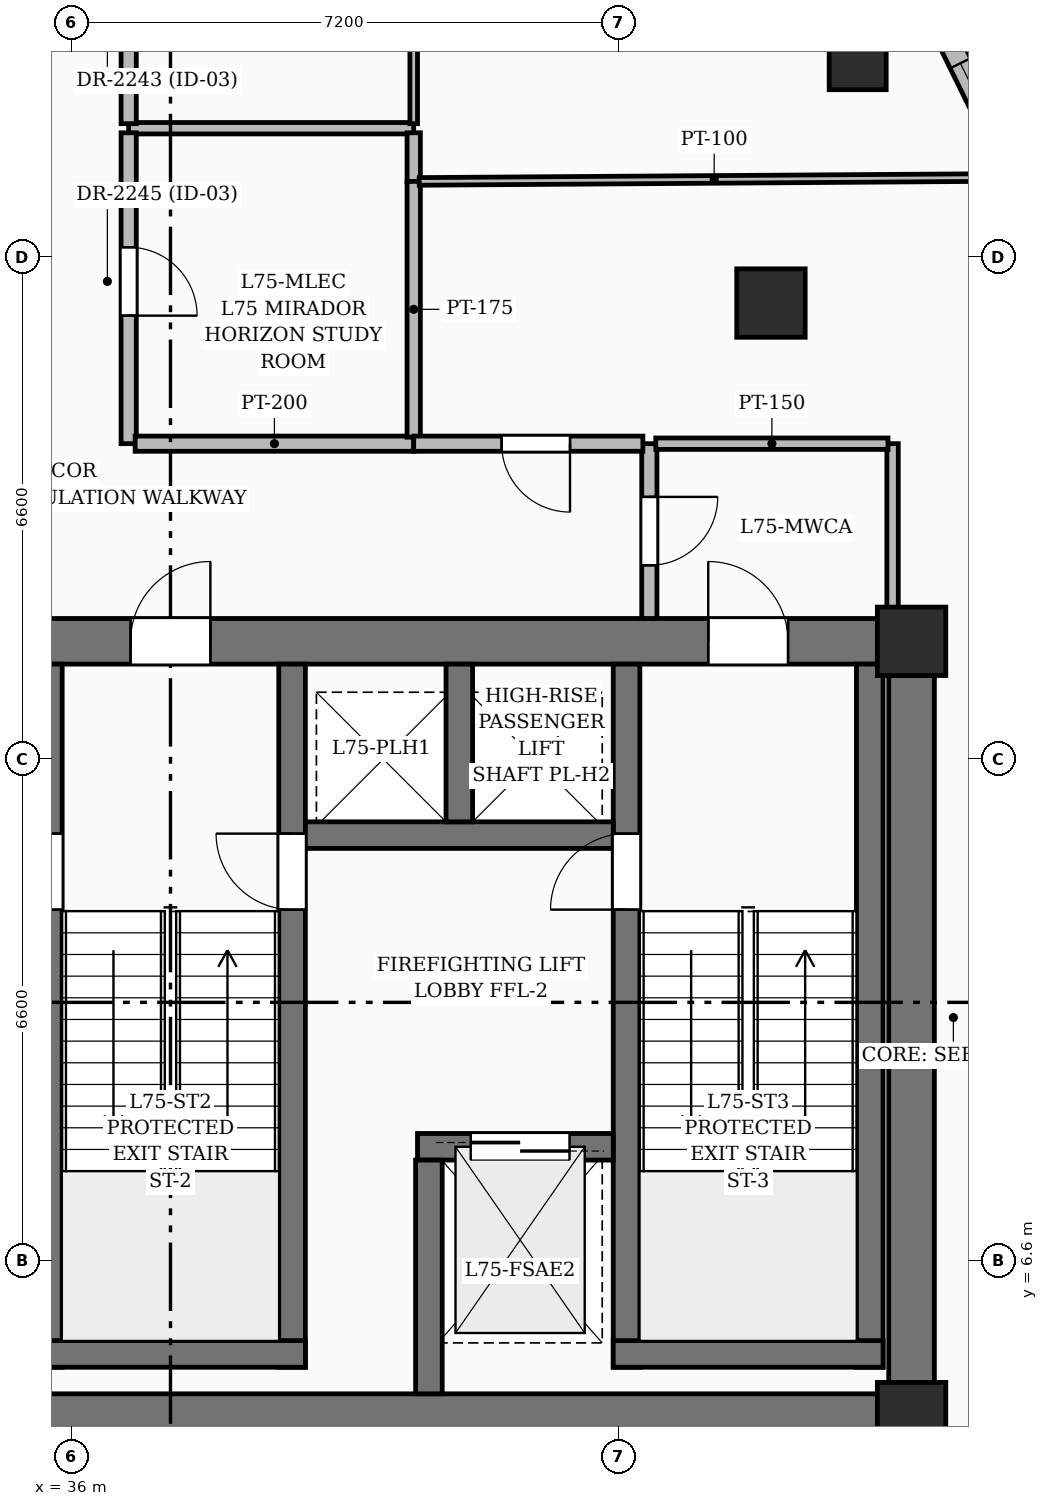
"""IFC4 building model, lengths in metres.
Left out: names, types, materials, properties, quantities, classifications, styles, units other than length and angle.
Written with IfcOpenShell. Run it as: python <this file> out.ifc"""

import sys

from ifc_helpers import new_model, si_unit, direction, frame, frame_2d, origin, origin_2d, place, context, subcontext, project, spatial, rectangle, extrude, element, fill, save


model = new_model("IFC4")
c1 = context("Model", 3, precision=1e-05, world=origin(), true_north=direction((0.0, 1.0)))
c2 = subcontext(c1, "Body", "Model", "MODEL_VIEW")
j1 = project(units=[si_unit("LENGTHUNIT", "METRE"), si_unit("PLANEANGLEUNIT", "RADIAN")], contexts=[c1])
p1 = place(None, origin())
s1 = spatial("IfcSite", under=j1, at=p1, CompositionType="ELEMENT")
p2 = place(p1, origin())
s2 = spatial("IfcBuilding", under=s1, at=p2, CompositionType="ELEMENT")
p3 = place(p2, frame((0.0, 0.0, 289.5)))
s3 = spatial("IfcBuildingStorey", under=s2, at=p3, CompositionType="ELEMENT", Elevation=289.5)
for number, where, z_axis, x_axis in (
    (1, (47.05, 4.55, 0.0), (0.0, 0.0, 1.0), (1.0, 0.0, 0.0)),
    (2, (47.05, 14.75, 0.0), (0.0, 0.0, 1.0), (1.0, 0.0, 0.0)),
    (3, (45.2, 19.2, 0.0), (0.0, 0.0, 1.0), (1.0, 0.0, 0.0)),
):
    element("IfcColumn", number, at=place(p3, frame(where, z_axis=z_axis, x_axis=x_axis)), inside=s3, PredefinedType="COLUMN", context=c2, shape_type="SweptSolid", body=[
        extrude(rectangle(XDim=0.9, YDim=0.9, at=origin_2d()), origin(), (0.0, 0.0, 1.0), 4.5),
    ])
p4 = place(p3, frame((35.6, 4.55, 0.0), z_axis=(0.0, 0.0, 1.0), x_axis=(1.0, 0.0, 0.0)))
e4 = element("IfcWall", 4, at=p4, inside=s3, PredefinedType="SHEAR", context=c2, shape_type="SweptSolid", body=[
    extrude(rectangle(XDim=11.0, YDim=0.6, at=frame_2d((5.5, 0.0))), origin(), (0.0, 0.0, 1.0), 4.5),
])
p5 = place(p3, frame((35.6, 14.75, 0.0), z_axis=(0.0, 0.0, 1.0), x_axis=(1.0, 0.0, 0.0)))
e5 = element("IfcWall", 5, at=p5, inside=s3, PredefinedType="SHEAR", context=c2, shape_type="SweptSolid", body=[
    extrude(rectangle(XDim=11.0, YDim=0.6, at=frame_2d((5.5, 0.0))), origin(), (0.0, 0.0, 1.0), 4.5),
])
p6 = place(p5, frame((1.175, 0.0, 0.0)))
e6 = element("IfcOpeningElement", 6, at=p6, cuts=e5, PredefinedType="OPENING", context=c2, shape_type="SweptSolid", body=[
    extrude(rectangle(XDim=1.05, YDim=2.15, at=frame_2d((0.525, 1.075))), frame((0.0, 0.31, 0.0), z_axis=(0.0, -1.0, 0.0), x_axis=(1.0, 0.0, 0.0)), (0.0, 0.0, 1.0), 0.62),
])
p7 = place(p5, frame((8.775, 0.0, 0.0)))
e7 = element("IfcOpeningElement", 7, at=p7, cuts=e5, PredefinedType="OPENING", context=c2, shape_type="SweptSolid", body=[
    extrude(rectangle(XDim=1.05, YDim=2.15, at=frame_2d((0.525, 1.075))), frame((0.0, 0.31, 0.0), z_axis=(0.0, -1.0, 0.0), x_axis=(1.0, 0.0, 0.0)), (0.0, 0.0, 1.0), 0.62),
])
p8 = place(p3, frame((47.05, 5.0, 0.0), z_axis=(0.0, 0.0, 1.0), x_axis=(0.0, 1.0, 0.0)))
e8 = element("IfcWall", 8, at=p8, inside=s3, PredefinedType="SHEAR", context=c2, shape_type="SweptSolid", body=[
    extrude(rectangle(XDim=9.3, YDim=0.6, at=frame_2d((4.65, 0.0))), origin(), (0.0, 0.0, 1.0), 4.5),
])
p9 = place(p3, frame((35.7, 5.2, 0.0), z_axis=(0.0, 0.0, 1.0), x_axis=(0.0, 1.0, 0.0)))
e9 = element("IfcWall", 9, at=p9, inside=s3, PredefinedType="SOLIDWALL", context=c2, shape_type="SweptSolid", body=[
    extrude(rectangle(XDim=9.25, YDim=0.35, at=frame_2d((4.625, 0.0))), origin(), (0.0, 0.0, 1.0), 4.5),
])
p10 = place(p9, frame((6.02, 0.0, 0.0)))
e10 = element("IfcOpeningElement", 10, at=p10, cuts=e9, PredefinedType="OPENING", context=c2, shape_type="SweptSolid", body=[
    extrude(rectangle(XDim=1.0, YDim=2.15, at=frame_2d((0.5, 1.075))), frame((0.0, 0.185, 0.0), z_axis=(0.0, -1.0, 0.0), x_axis=(1.0, 0.0, 0.0)), (0.0, 0.0, 1.0), 0.37),
])
p11 = place(p3, frame((38.9, 5.2, 0.0), z_axis=(0.0, 0.0, 1.0), x_axis=(0.0, 1.0, 0.0)))
e11 = element("IfcWall", 11, at=p11, inside=s3, PredefinedType="SOLIDWALL", context=c2, shape_type="SweptSolid", body=[
    extrude(rectangle(XDim=9.25, YDim=0.35, at=frame_2d((4.625, 0.0))), origin(), (0.0, 0.0, 1.0), 4.5),
])
p12 = place(p11, frame((6.02, 0.0, 0.0)))
e12 = element("IfcOpeningElement", 12, at=p12, cuts=e11, PredefinedType="OPENING", context=c2, shape_type="SweptSolid", body=[
    extrude(rectangle(XDim=1.0, YDim=2.15, at=frame_2d((0.5, 1.075))), frame((0.0, 0.185, 0.0), z_axis=(0.0, -1.0, 0.0), x_axis=(1.0, 0.0, 0.0)), (0.0, 0.0, 1.0), 0.37),
])
p13 = place(p3, frame((35.525, 5.375, 0.0), z_axis=(0.0, 0.0, 1.0), x_axis=(1.0, 0.0, 0.0)))
e13 = element("IfcWall", 13, at=p13, inside=s3, PredefinedType="SOLIDWALL", context=c2, shape_type="SweptSolid", body=[
    extrude(rectangle(XDim=3.55, YDim=0.35, at=frame_2d((1.775, 0.0))), origin(), (0.0, 0.0, 1.0), 4.5),
])
p14 = place(p3, frame((43.3, 5.2, 0.0), z_axis=(0.0, 0.0, 1.0), x_axis=(0.0, 1.0, 0.0)))
e14 = element("IfcWall", 14, at=p14, inside=s3, PredefinedType="SOLIDWALL", context=c2, shape_type="SweptSolid", body=[
    extrude(rectangle(XDim=9.25, YDim=0.35, at=frame_2d((4.625, 0.0))), origin(), (0.0, 0.0, 1.0), 4.5),
])
p15 = place(p14, frame((6.02, 0.0, 0.0)))
e15 = element("IfcOpeningElement", 15, at=p15, cuts=e14, PredefinedType="OPENING", context=c2, shape_type="SweptSolid", body=[
    extrude(rectangle(XDim=1.0, YDim=2.15, at=frame_2d((0.5, 1.075))), frame((0.0, 0.185, 0.0), z_axis=(0.0, -1.0, 0.0), x_axis=(1.0, 0.0, 0.0)), (0.0, 0.0, 1.0), 0.37),
])
p16 = place(p3, frame((46.5, 5.2, 0.0), z_axis=(0.0, 0.0, 1.0), x_axis=(0.0, 1.0, 0.0)))
e16 = element("IfcWall", 16, at=p16, inside=s3, PredefinedType="SOLIDWALL", context=c2, shape_type="SweptSolid", body=[
    extrude(rectangle(XDim=9.25, YDim=0.35, at=frame_2d((4.625, 0.0))), origin(), (0.0, 0.0, 1.0), 4.5),
])
p17 = place(p3, frame((43.125, 5.375, 0.0), z_axis=(0.0, 0.0, 1.0), x_axis=(1.0, 0.0, 0.0)))
e17 = element("IfcWall", 17, at=p17, inside=s3, PredefinedType="SOLIDWALL", context=c2, shape_type="SweptSolid", body=[
    extrude(rectangle(XDim=3.55, YDim=0.35, at=frame_2d((1.775, 0.0))), origin(), (0.0, 0.0, 1.0), 4.5),
])
p18 = place(p3, frame((40.55, 8.1, 0.0), z_axis=(0.0, 0.0, 1.0), x_axis=(1.0, 0.0, 0.0)))
e18 = element("IfcWall", 18, at=p18, inside=s3, PredefinedType="SOLIDWALL", context=c2, shape_type="SweptSolid", body=[
    extrude(rectangle(XDim=2.575, YDim=0.35, at=frame_2d((1.288, 0.0))), origin(), (0.0, 0.0, 1.0), 4.5),
])
p19 = place(p18, frame((0.7, 0.0, 0.0)))
e19 = element("IfcOpeningElement", 19, at=p19, cuts=e18, PredefinedType="OPENING", context=c2, shape_type="SweptSolid", body=[
    extrude(rectangle(XDim=1.3, YDim=2.25, at=frame_2d((0.65, 1.125))), frame((0.0, 0.185, 0.0), z_axis=(0.0, -1.0, 0.0), x_axis=(1.0, 0.0, 0.0)), (0.0, 0.0, 1.0), 0.37),
])
p20 = place(p3, frame((40.7, 4.85, 0.0), z_axis=(0.0, 0.0, 1.0), x_axis=(0.0, 1.0, 0.0)))
e20 = element("IfcWall", 20, at=p20, inside=s3, PredefinedType="SOLIDWALL", context=c2, shape_type="SweptSolid", body=[
    extrude(rectangle(XDim=3.075, YDim=0.35, at=frame_2d((1.538, 0.0))), origin(), (0.0, 0.0, 1.0), 4.5),
])
p21 = place(p3, frame((39.075, 12.2, 0.0), z_axis=(0.0, 0.0, 1.0), x_axis=(1.0, 0.0, 0.0)))
e21 = element("IfcWall", 21, at=p21, inside=s3, PredefinedType="SOLIDWALL", context=c2, shape_type="SweptSolid", body=[
    extrude(rectangle(XDim=4.05, YDim=0.35, at=frame_2d((2.025, 0.0))), origin(), (0.0, 0.0, 1.0), 4.5),
])
p22 = place(p3, frame((41.1, 12.375, 0.0), z_axis=(0.0, 0.0, 1.0), x_axis=(0.0, 1.0, 0.0)))
e22 = element("IfcWall", 22, at=p22, inside=s3, PredefinedType="SOLIDWALL", context=c2, shape_type="SweptSolid", body=[
    extrude(rectangle(XDim=2.075, YDim=0.35, at=frame_2d((1.038, 0.0))), origin(), (0.0, 0.0, 1.0), 4.5),
])
p23 = place(p3, frame((46.341, 22.382, 0.0), z_axis=(0.0, 0.0, 1.0), x_axis=(1.0, 0.0, 0.0)))
e23 = element("IfcColumn", 23, at=p23, inside=s3, PredefinedType="COLUMN", context=c2, shape_type="SweptSolid", body=[
    extrude(rectangle(XDim=0.75, YDim=0.75, at=origin_2d()), origin(), (0.0, 0.0, 1.0), 4.5),
])
p24 = place(p3, frame((47.45, 22.848, 0.0), z_axis=(0.0, 0.0, 1.0), x_axis=(0.441291922586, -0.897363604711, 0.0)))
e24 = element("IfcWall", 24, at=p24, inside=s3, PredefinedType="SOLIDWALL", context=c2, shape_type="SweptSolid", body=[
    extrude(rectangle(XDim=6.624, YDim=0.3, at=frame_2d((3.312, 0.0))), origin(), (0.0, 0.0, 1.0), 4.2),
])
p25 = place(p24, frame((0.55, 0.0, 0.8)))
e25 = element("IfcOpeningElement", 25, at=p25, cuts=e24, PredefinedType="OPENING", context=c2, shape_type="SweptSolid", body=[
    extrude(rectangle(XDim=1.2, YDim=1.8, at=frame_2d((0.6, 0.9))), frame((0.0, 0.16, 0.0), z_axis=(0.0, -1.0, 0.0), x_axis=(1.0, 0.0, 0.0)), (0.0, 0.0, 1.0), 0.32),
])
p26 = place(p24, frame((3.35, 0.0, 0.55)))
e26 = element("IfcOpeningElement", 26, at=p26, cuts=e24, PredefinedType="OPENING", context=c2, shape_type="SweptSolid", body=[
    extrude(rectangle(XDim=1.6, YDim=2.2, at=frame_2d((0.8, 1.1))), frame((0.0, 0.16, 0.0), z_axis=(0.0, -1.0, 0.0), x_axis=(1.0, 0.0, 0.0)), (0.0, 0.0, 1.0), 0.32),
])
p27 = place(p3, frame((43.6, 17.35, 0.0), z_axis=(0.0, 0.0, 1.0), x_axis=(0.0, -1.0, 0.0)))
e27 = element("IfcWall", 27, at=p27, inside=s3, PredefinedType="PARTITIONING", context=c2, shape_type="SweptSolid", body=[
    extrude(rectangle(XDim=2.3, YDim=0.2, at=frame_2d((1.15, 0.0))), origin(), (0.0, 0.0, 1.0), 4.2),
])
p28 = place(p27, frame((0.7, 0.0, 0.0)))
e28 = element("IfcOpeningElement", 28, at=p28, cuts=e27, PredefinedType="OPENING", context=c2, shape_type="SweptSolid", body=[
    extrude(rectangle(XDim=0.9, YDim=2.1, at=frame_2d((0.45, 1.05))), frame((0.0, 0.11, 0.0), z_axis=(0.0, -1.0, 0.0), x_axis=(1.0, 0.0, 0.0)), (0.0, 0.0, 1.0), 0.22),
])
p29 = place(p3, frame((46.8, 15.05, 0.0), z_axis=(0.0, 0.0, 1.0), x_axis=(0.0, 1.0, 0.0)))
e29 = element("IfcWall", 29, at=p29, inside=s3, PredefinedType="PARTITIONING", context=c2, shape_type="SweptSolid", body=[
    extrude(rectangle(XDim=2.3, YDim=0.15, at=frame_2d((1.15, 0.0))), origin(), (0.0, 0.0, 1.0), 3.535),
])
p30 = place(p3, frame((46.74, 17.35, 0.0), z_axis=(0.0, 0.0, 1.0), x_axis=(-1.0, 0.0, 0.0)))
e30 = element("IfcWall", 30, at=p30, inside=s3, PredefinedType="PARTITIONING", context=c2, shape_type="SweptSolid", body=[
    extrude(rectangle(XDim=3.055, YDim=0.15, at=frame_2d((1.527, 0.0))), origin(), (0.0, 0.0, 1.0), 3.535),
])
p31 = place(p3, frame((36.75, 21.5, 0.0), z_axis=(0.0, 0.0, 1.0), x_axis=(1.0, 0.0, 0.0)))
e31 = element("IfcWall", 31, at=p31, inside=s3, PredefinedType="PARTITIONING", context=c2, shape_type="SweptSolid", body=[
    extrude(rectangle(XDim=3.75, YDim=0.15, at=frame_2d((1.875, 0.0))), origin(), (0.0, 0.0, 1.0), 3.535),
])
p32 = place(p3, frame((40.5, 21.56, 0.0), z_axis=(0.0, 0.0, 1.0), x_axis=(0.0, 1.0, 0.0)))
e32 = element("IfcWall", 32, at=p32, inside=s3, PredefinedType="PARTITIONING", context=c2, shape_type="SweptSolid", body=[
    extrude(rectangle(XDim=3.34, YDim=0.1, at=frame_2d((1.67, 0.0))), origin(), (0.0, 0.0, 1.0), 3.535),
])
p33 = place(p32, frame((1.222, 0.0, 0.0)))
e33 = element("IfcOpeningElement", 33, at=p33, cuts=e32, PredefinedType="OPENING", context=c2, shape_type="SweptSolid", body=[
    extrude(rectangle(XDim=0.95, YDim=2.2, at=frame_2d((0.475, 1.1))), frame((0.0, 0.06, 0.0), z_axis=(0.0, -1.0, 0.0), x_axis=(1.0, 0.0, 0.0)), (0.0, 0.0, 1.0), 0.12),
])
p34 = place(p3, frame((36.75, 24.827, 0.0), z_axis=(0.0, 0.0, 1.0), x_axis=(0.0, -1.0, 0.0)))
e34 = element("IfcWall", 34, at=p34, inside=s3, PredefinedType="PARTITIONING", context=c2, shape_type="SweptSolid", body=[
    extrude(rectangle(XDim=3.267, YDim=0.2, at=frame_2d((1.634, 0.0))), origin(), (0.0, 0.0, 1.0), 3.86),
])
p35 = place(p34, frame((1.119, 0.0, 0.0)))
e35 = element("IfcOpeningElement", 35, at=p35, cuts=e34, PredefinedType="OPENING", context=c2, shape_type="SweptSolid", body=[
    extrude(rectangle(XDim=0.9, YDim=2.1, at=frame_2d((0.45, 1.05))), frame((0.0, 0.11, 0.0), z_axis=(0.0, -1.0, 0.0), x_axis=(1.0, 0.0, 0.0)), (0.0, 0.0, 1.0), 0.22),
])
p36 = place(p3, frame((40.5, 20.8, 0.0), z_axis=(0.0, 0.0, 1.0), x_axis=(0.0, 1.0, 0.0)))
e36 = element("IfcWall", 36, at=p36, inside=s3, PredefinedType="PARTITIONING", context=c2, shape_type="SweptSolid", body=[
    extrude(rectangle(XDim=0.64, YDim=0.175, at=frame_2d((0.32, 0.0))), origin(), (0.0, 0.0, 1.0), 4.2),
])
p37 = place(p3, frame((36.75, 21.44, 0.0), z_axis=(0.0, 0.0, 1.0), x_axis=(0.0, -1.0, 0.0)))
e37 = element("IfcWall", 37, at=p37, inside=s3, PredefinedType="PARTITIONING", context=c2, shape_type="SweptSolid", body=[
    extrude(rectangle(XDim=4.09, YDim=0.2, at=frame_2d((2.045, 0.0))), origin(), (0.0, 0.0, 1.0), 3.535),
])
p38 = place(p37, frame((1.506, 0.0, 0.0)))
e38 = element("IfcOpeningElement", 38, at=p38, cuts=e37, PredefinedType="OPENING", context=c2, shape_type="SweptSolid", body=[
    extrude(rectangle(XDim=0.9, YDim=2.1, at=frame_2d((0.45, 1.05))), frame((0.0, 0.11, 0.0), z_axis=(0.0, -1.0, 0.0), x_axis=(1.0, 0.0, 0.0)), (0.0, 0.0, 1.0), 0.22),
])
p39 = place(p3, frame((36.835, 17.35, 0.0), z_axis=(0.0, 0.0, 1.0), x_axis=(1.0, 0.0, 0.0)))
e39 = element("IfcWall", 39, at=p39, inside=s3, PredefinedType="PARTITIONING", context=c2, shape_type="SweptSolid", body=[
    extrude(rectangle(XDim=3.665, YDim=0.2, at=frame_2d((1.833, 0.0))), origin(), (0.0, 0.0, 1.0), 4.2),
])
p40 = place(p3, frame((40.5, 17.435, 0.0), z_axis=(0.0, 0.0, 1.0), x_axis=(0.0, 1.0, 0.0)))
e40 = element("IfcWall", 40, at=p40, inside=s3, PredefinedType="PARTITIONING", context=c2, shape_type="SweptSolid", body=[
    extrude(rectangle(XDim=3.365, YDim=0.175, at=frame_2d((1.683, 0.0))), origin(), (0.0, 0.0, 1.0), 4.2),
])
p41 = place(p3, frame((40.573, 20.8, 0.0), z_axis=(0.0, 0.0, 1.0), x_axis=(0.999976919028, 0.006794218946, 0.0)))
e41 = element("IfcWall", 41, at=p41, inside=s3, PredefinedType="PARTITIONING", context=c2, shape_type="SweptSolid", body=[
    extrude(rectangle(XDim=7.762, YDim=0.1, at=frame_2d((3.881, 0.0))), origin(), (0.0, 0.0, 1.0), 3.391),
])
p42 = place(p3, frame((43.515, 17.35, 0.0), z_axis=(0.0, 0.0, 1.0), x_axis=(-1.0, 0.0, 0.0)))
e42 = element("IfcWall", 42, at=p42, inside=s3, PredefinedType="PARTITIONING", context=c2, shape_type="SweptSolid", body=[
    extrude(rectangle(XDim=3.015, YDim=0.2, at=frame_2d((1.507, 0.0))), origin(), (0.0, 0.0, 1.0), 4.2),
])
p43 = place(p42, frame((0.958, 0.0, 0.0)))
e43 = element("IfcOpeningElement", 43, at=p43, cuts=e42, PredefinedType="OPENING", context=c2, shape_type="SweptSolid", body=[
    extrude(rectangle(XDim=0.9, YDim=2.1, at=frame_2d((0.45, 1.05))), frame((0.0, 0.11, 0.0), z_axis=(0.0, -1.0, 0.0), x_axis=(1.0, 0.0, 0.0)), (0.0, 0.0, 1.0), 0.22),
])
p44 = place(p25, origin())
e44 = element("IfcWindow", 44, at=p44, inside=s3, PartitioningType="SINGLE_PANEL", PredefinedType="WINDOW", context=c2, shape_type="SweptSolid", body=[
    extrude(rectangle(XDim=1.2, YDim=1.8, at=frame_2d((0.6, 0.9))), frame((0.0, 0.03, 0.0), z_axis=(0.0, -1.0, 0.0), x_axis=(1.0, 0.0, 0.0)), (0.0, 0.0, 1.0), 0.06),
])
fill(e25, e44)
p45 = place(p6, origin())
e45 = element("IfcDoor", 45, at=p45, inside=s3, OperationType="SINGLE_SWING_RIGHT", PredefinedType="DOOR", context=c2, shape_type="SweptSolid", body=[
    extrude(rectangle(XDim=1.05, YDim=2.15, at=frame_2d((0.525, 1.075))), frame((0.0, 0.025, 0.0), z_axis=(0.0, -1.0, 0.0), x_axis=(1.0, 0.0, 0.0)), (0.0, 0.0, 1.0), 0.05),
])
fill(e6, e45)
p46 = place(p7, origin())
e46 = element("IfcDoor", 46, at=p46, inside=s3, OperationType="SINGLE_SWING_LEFT", PredefinedType="DOOR", context=c2, shape_type="SweptSolid", body=[
    extrude(rectangle(XDim=1.05, YDim=2.15, at=frame_2d((0.525, 1.075))), frame((0.0, 0.025, 0.0), z_axis=(0.0, -1.0, 0.0), x_axis=(1.0, 0.0, 0.0)), (0.0, 0.0, 1.0), 0.05),
])
fill(e7, e46)
p47 = place(p12, origin())
e47 = element("IfcDoor", 47, at=p47, inside=s3, OperationType="SINGLE_SWING_RIGHT", PredefinedType="DOOR", context=c2, shape_type="SweptSolid", body=[
    extrude(rectangle(XDim=1.0, YDim=2.15, at=frame_2d((0.5, 1.075))), frame((0.0, 0.025, 0.0), z_axis=(0.0, -1.0, 0.0), x_axis=(1.0, 0.0, 0.0)), (0.0, 0.0, 1.0), 0.05),
])
fill(e12, e47)
p48 = place(p15, origin())
e48 = element("IfcDoor", 48, at=p48, inside=s3, OperationType="SINGLE_SWING_LEFT", PredefinedType="DOOR", context=c2, shape_type="SweptSolid", body=[
    extrude(rectangle(XDim=1.0, YDim=2.15, at=frame_2d((0.5, 1.075))), frame((0.0, 0.025, 0.0), z_axis=(0.0, -1.0, 0.0), x_axis=(1.0, 0.0, 0.0)), (0.0, 0.0, 1.0), 0.05),
])
fill(e15, e48)
p49 = place(p19, origin())
e49 = element("IfcDoor", 49, at=p49, inside=s3, OperationType="DOUBLE_DOOR_SLIDING", PredefinedType="DOOR", context=c2, shape_type="SweptSolid", body=[
    extrude(rectangle(XDim=1.3, YDim=2.25, at=frame_2d((0.65, 1.125))), frame((0.0, 0.025, 0.0), z_axis=(0.0, -1.0, 0.0), x_axis=(1.0, 0.0, 0.0)), (0.0, 0.0, 1.0), 0.05),
])
fill(e19, e49)
p50 = place(p38, origin())
e50 = element("IfcDoor", 50, at=p50, inside=s3, OperationType="SINGLE_SWING_RIGHT", PredefinedType="DOOR", context=c2, shape_type="SweptSolid", body=[
    extrude(rectangle(XDim=0.9, YDim=2.1, at=frame_2d((0.45, 1.05))), frame((0.0, 0.025, 0.0), z_axis=(0.0, -1.0, 0.0), x_axis=(1.0, 0.0, 0.0)), (0.0, 0.0, 1.0), 0.05),
])
fill(e38, e50)
p51 = place(p43, origin())
e51 = element("IfcDoor", 51, at=p51, inside=s3, OperationType="SINGLE_SWING_LEFT", PredefinedType="DOOR", context=c2, shape_type="SweptSolid", body=[
    extrude(rectangle(XDim=0.9, YDim=2.1, at=frame_2d((0.45, 1.05))), frame((0.0, 0.025, 0.0), z_axis=(0.0, -1.0, 0.0), x_axis=(1.0, 0.0, 0.0)), (0.0, 0.0, 1.0), 0.05),
])
fill(e43, e51)
p52 = place(p28, origin())
e52 = element("IfcDoor", 52, at=p52, inside=s3, OperationType="SINGLE_SWING_LEFT", PredefinedType="DOOR", context=c2, shape_type="SweptSolid", body=[
    extrude(rectangle(XDim=0.9, YDim=2.1, at=frame_2d((0.45, 1.05))), frame((0.0, 0.025, 0.0), z_axis=(0.0, -1.0, 0.0), x_axis=(1.0, 0.0, 0.0)), (0.0, 0.0, 1.0), 0.05),
])
fill(e28, e52)
save(model, sys.argv[1])
